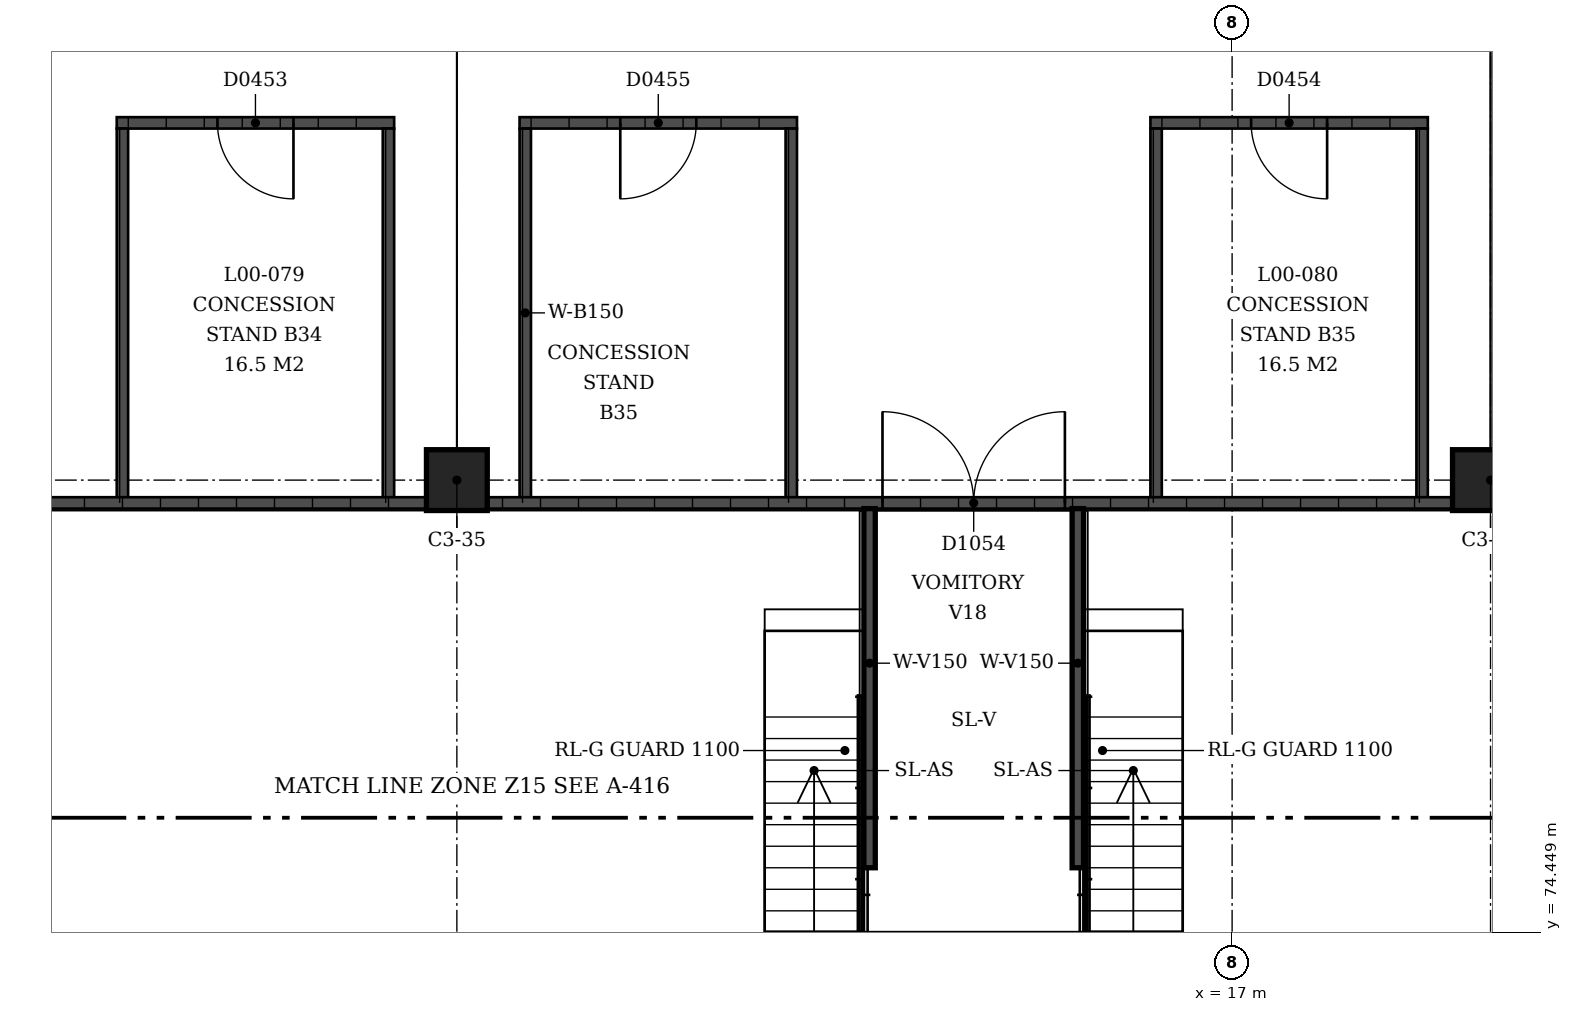
"""IFC4 building model, lengths in metres.
Left out: names, types, materials, properties, quantities, classifications, styles, units other than length and angle.
Written with IfcOpenShell. Run it as: python <this file> out.ifc"""

import sys

from ifc_helpers import new_model, si_unit, direction, frame, frame_2d, origin, origin_2d, place, context, subcontext, project, spatial, rectangle, extrude, element, fill, save


model = new_model("IFC4")
c1 = context("Model", 3, precision=1e-05, world=origin(), true_north=direction((0.0, 1.0)))
c2 = subcontext(c1, "Body", "Model", "MODEL_VIEW")
j1 = project(units=[si_unit("LENGTHUNIT", "METRE"), si_unit("PLANEANGLEUNIT", "RADIAN")], contexts=[c1])
p1 = place(None, origin())
s1 = spatial("IfcSite", under=j1, at=p1, CompositionType="ELEMENT")
p2 = place(p1, origin())
s2 = spatial("IfcBuilding", under=s1, at=p2, CompositionType="ELEMENT")
p3 = place(p2, origin())
s3 = spatial("IfcBuildingStorey", under=s2, at=p3, CompositionType="ELEMENT", Elevation=0.0)
p4 = place(p3, frame((6.8, 80.4, 0.0), z_axis=(0.0, 0.0, 1.0), x_axis=(-1.0, 0.0, 0.0)))
e1 = element("IfcColumn", 1, at=p4, inside=s3, PredefinedType="COLUMN", context=c2, shape_type="SweptSolid", body=[
    extrude(rectangle(XDim=0.8, YDim=0.8, at=origin_2d()), origin(), (0.0, 0.0, 1.0), 4.5),
])
p5 = place(p3, frame((20.4, 80.4, 0.0), z_axis=(0.0, 0.0, 1.0), x_axis=(-1.0, 0.0, 0.0)))
e2 = element("IfcColumn", 2, at=p5, inside=s3, PredefinedType="COLUMN", context=c2, shape_type="SweptSolid", body=[
    extrude(rectangle(XDim=1.0, YDim=0.8, at=origin_2d()), origin(), (0.0, 0.0, 1.0), 4.5),
])
p6 = place(p3, frame((2.325, 85.1, 0.0), z_axis=(0.0, 0.0, 1.0), x_axis=(1.0, 0.0, 0.0)))
e3 = element("IfcWall", 3, at=p6, inside=s3, PredefinedType="SOLIDWALL", context=c2, shape_type="SweptSolid", body=[
    extrude(rectangle(XDim=3.65, YDim=0.15, at=frame_2d((1.825, 0.0))), origin(), (0.0, 0.0, 1.0), 3.0),
])
p7 = place(p6, frame((1.325, 0.0, 0.0)))
e4 = element("IfcOpeningElement", 4, at=p7, cuts=e3, PredefinedType="OPENING", context=c2, shape_type="SweptSolid", body=[
    extrude(rectangle(XDim=1.0, YDim=2.1, at=frame_2d((0.5, 1.05))), frame((0.0, 0.075, 0.0), z_axis=(0.0, -1.0, 0.0), x_axis=(1.0, 0.0, 0.0)), (0.0, 0.0, 1.0), 0.15),
])
for number, where, z_axis, x_axis in (
    (5, (2.4, 80.1, 0.0), (0.0, 0.0, 1.0), (0.0, 1.0, 0.0)),
    (6, (5.9, 80.1, 0.0), (0.0, 0.0, 1.0), (0.0, 1.0, 0.0)),
):
    element("IfcWall", number, at=place(p3, frame(where, z_axis=z_axis, x_axis=x_axis)), inside=s3, PredefinedType="SOLIDWALL", context=c2, shape_type="SweptSolid", body=[
        extrude(rectangle(XDim=4.925, YDim=0.15, at=frame_2d((2.462, 0.0))), origin(), (0.0, 0.0, 1.0), 3.0),
    ])
p8 = place(p3, frame((19.575, 85.1, 0.0), z_axis=(0.0, 0.0, 1.0), x_axis=(-1.0, 0.0, 0.0)))
e7 = element("IfcWall", 7, at=p8, inside=s3, PredefinedType="SOLIDWALL", context=c2, shape_type="SweptSolid", body=[
    extrude(rectangle(XDim=3.65, YDim=0.15, at=frame_2d((1.825, 0.0))), origin(), (0.0, 0.0, 1.0), 3.0),
])
p9 = place(p8, frame((1.325, 0.0, 0.0)))
e8 = element("IfcOpeningElement", 8, at=p9, cuts=e7, PredefinedType="OPENING", context=c2, shape_type="SweptSolid", body=[
    extrude(rectangle(XDim=1.0, YDim=2.1, at=frame_2d((0.5, 1.05))), frame((0.0, 0.075, 0.0), z_axis=(0.0, -1.0, 0.0), x_axis=(1.0, 0.0, 0.0)), (0.0, 0.0, 1.0), 0.15),
])
for number, where, z_axis, x_axis in (
    (9, (19.5, 80.1, 0.0), (0.0, 0.0, 1.0), (0.0, 1.0, 0.0)),
    (10, (16.0, 80.1, 0.0), (0.0, 0.0, 1.0), (0.0, 1.0, 0.0)),
):
    element("IfcWall", number, at=place(p3, frame(where, z_axis=z_axis, x_axis=x_axis)), inside=s3, PredefinedType="SOLIDWALL", context=c2, shape_type="SweptSolid", body=[
        extrude(rectangle(XDim=4.925, YDim=0.15, at=frame_2d((2.462, 0.0))), origin(), (0.0, 0.0, 1.0), 3.0),
    ])
p10 = place(p3, frame((11.275, 85.1, 0.0), z_axis=(0.0, 0.0, 1.0), x_axis=(-1.0, 0.0, 0.0)))
e11 = element("IfcWall", 11, at=p10, inside=s3, PredefinedType="SOLIDWALL", context=c2, shape_type="SweptSolid", body=[
    extrude(rectangle(XDim=3.65, YDim=0.15, at=frame_2d((1.825, 0.0))), origin(), (0.0, 0.0, 1.0), 3.0),
])
p11 = place(p10, frame((1.325, 0.0, 0.0)))
e12 = element("IfcOpeningElement", 12, at=p11, cuts=e11, PredefinedType="OPENING", context=c2, shape_type="SweptSolid", body=[
    extrude(rectangle(XDim=1.0, YDim=2.1, at=frame_2d((0.5, 1.05))), frame((0.0, 0.075, 0.0), z_axis=(0.0, -1.0, 0.0), x_axis=(1.0, 0.0, 0.0)), (0.0, 0.0, 1.0), 0.15),
])
for number, where, z_axis, x_axis in (
    (13, (11.2, 80.1, 0.0), (0.0, 0.0, 1.0), (0.0, 1.0, 0.0)),
    (14, (7.7, 80.1, 0.0), (0.0, 0.0, 1.0), (0.0, 1.0, 0.0)),
):
    element("IfcWall", number, at=place(p3, frame(where, z_axis=z_axis, x_axis=x_axis)), inside=s3, PredefinedType="SOLIDWALL", context=c2, shape_type="SweptSolid", body=[
        extrude(rectangle(XDim=4.925, YDim=0.15, at=frame_2d((2.462, 0.0))), origin(), (0.0, 0.0, 1.0), 3.0),
    ])
p12 = place(p3, frame((-6.3, 80.1, 0.0), z_axis=(0.0, 0.0, 1.0), x_axis=(1.0, 0.0, 0.0)))
e15 = element("IfcWall", 15, at=p12, inside=s3, PredefinedType="SOLIDWALL", context=c2, shape_type="SweptSolid", body=[
    extrude(rectangle(XDim=12.7, YDim=0.15, at=frame_2d((6.35, 0.0))), origin(), (0.0, 0.0, 1.0), 3.0),
])
p13 = place(p3, frame((7.2, 80.1, 0.0), z_axis=(0.0, 0.0, 1.0), x_axis=(1.0, 0.0, 0.0)))
e16 = element("IfcWall", 16, at=p13, inside=s3, PredefinedType="SOLIDWALL", context=c2, shape_type="SweptSolid", body=[
    extrude(rectangle(XDim=12.7, YDim=0.15, at=frame_2d((6.35, 0.0))), origin(), (0.0, 0.0, 1.0), 3.0),
])
p14 = place(p13, frame((5.2, 0.0, 0.0)))
e17 = element("IfcOpeningElement", 17, at=p14, cuts=e16, PredefinedType="OPENING", context=c2, shape_type="SweptSolid", body=[
    extrude(rectangle(XDim=2.4, YDim=2.4, at=frame_2d((1.2, 1.2))), frame((0.0, 0.075, 0.0), z_axis=(0.0, -1.0, 0.0), x_axis=(1.0, 0.0, 0.0)), (0.0, 0.0, 1.0), 0.15),
])
for number, where, z_axis, x_axis in (
    (18, (14.97, 75.3, 0.0), (0.0, 0.0, 1.0), (0.0, 1.0, 0.0)),
    (19, (12.23, 75.3, 0.0), (0.0, 0.0, 1.0), (0.0, 1.0, 0.0)),
):
    element("IfcWall", number, at=place(p3, frame(where, z_axis=z_axis, x_axis=x_axis)), inside=s3, PredefinedType="SOLIDWALL", context=c2, shape_type="SweptSolid", body=[
        extrude(rectangle(XDim=4.725, YDim=0.15, at=frame_2d((2.362, 0.0))), origin(), (0.0, 0.0, 1.0), 2.75),
    ])
p15 = place(p7, origin())
e20 = element("IfcDoor", 20, at=p15, inside=s3, OperationType="SINGLE_SWING_RIGHT", PredefinedType="DOOR", context=c2, shape_type="SweptSolid", body=[
    extrude(rectangle(XDim=1.0, YDim=2.1, at=frame_2d((0.5, 1.05))), frame((0.0, 0.025, 0.0), z_axis=(0.0, -1.0, 0.0), x_axis=(1.0, 0.0, 0.0)), (0.0, 0.0, 1.0), 0.05),
])
fill(e4, e20)
p16 = place(p9, origin())
e21 = element("IfcDoor", 21, at=p16, inside=s3, OperationType="SINGLE_SWING_RIGHT", PredefinedType="DOOR", context=c2, shape_type="SweptSolid", body=[
    extrude(rectangle(XDim=1.0, YDim=2.1, at=frame_2d((0.5, 1.05))), frame((0.0, 0.025, 0.0), z_axis=(0.0, -1.0, 0.0), x_axis=(1.0, 0.0, 0.0)), (0.0, 0.0, 1.0), 0.05),
])
fill(e8, e21)
p17 = place(p11, origin())
e22 = element("IfcDoor", 22, at=p17, inside=s3, OperationType="SINGLE_SWING_LEFT", PredefinedType="DOOR", context=c2, shape_type="SweptSolid", body=[
    extrude(rectangle(XDim=1.0, YDim=2.1, at=frame_2d((0.5, 1.05))), frame((0.0, 0.025, 0.0), z_axis=(0.0, -1.0, 0.0), x_axis=(1.0, 0.0, 0.0)), (0.0, 0.0, 1.0), 0.05),
])
fill(e12, e22)
p18 = place(p14, origin())
e23 = element("IfcDoor", 23, at=p18, inside=s3, OperationType="DOUBLE_DOOR_SINGLE_SWING", PredefinedType="DOOR", context=c2, shape_type="SweptSolid", body=[
    extrude(rectangle(XDim=2.4, YDim=2.4, at=frame_2d((1.2, 1.2))), frame((0.0, 0.025, 0.0), z_axis=(0.0, -1.0, 0.0), x_axis=(1.0, 0.0, 0.0)), (0.0, 0.0, 1.0), 0.05),
])
fill(e17, e23)
save(model, sys.argv[1])
